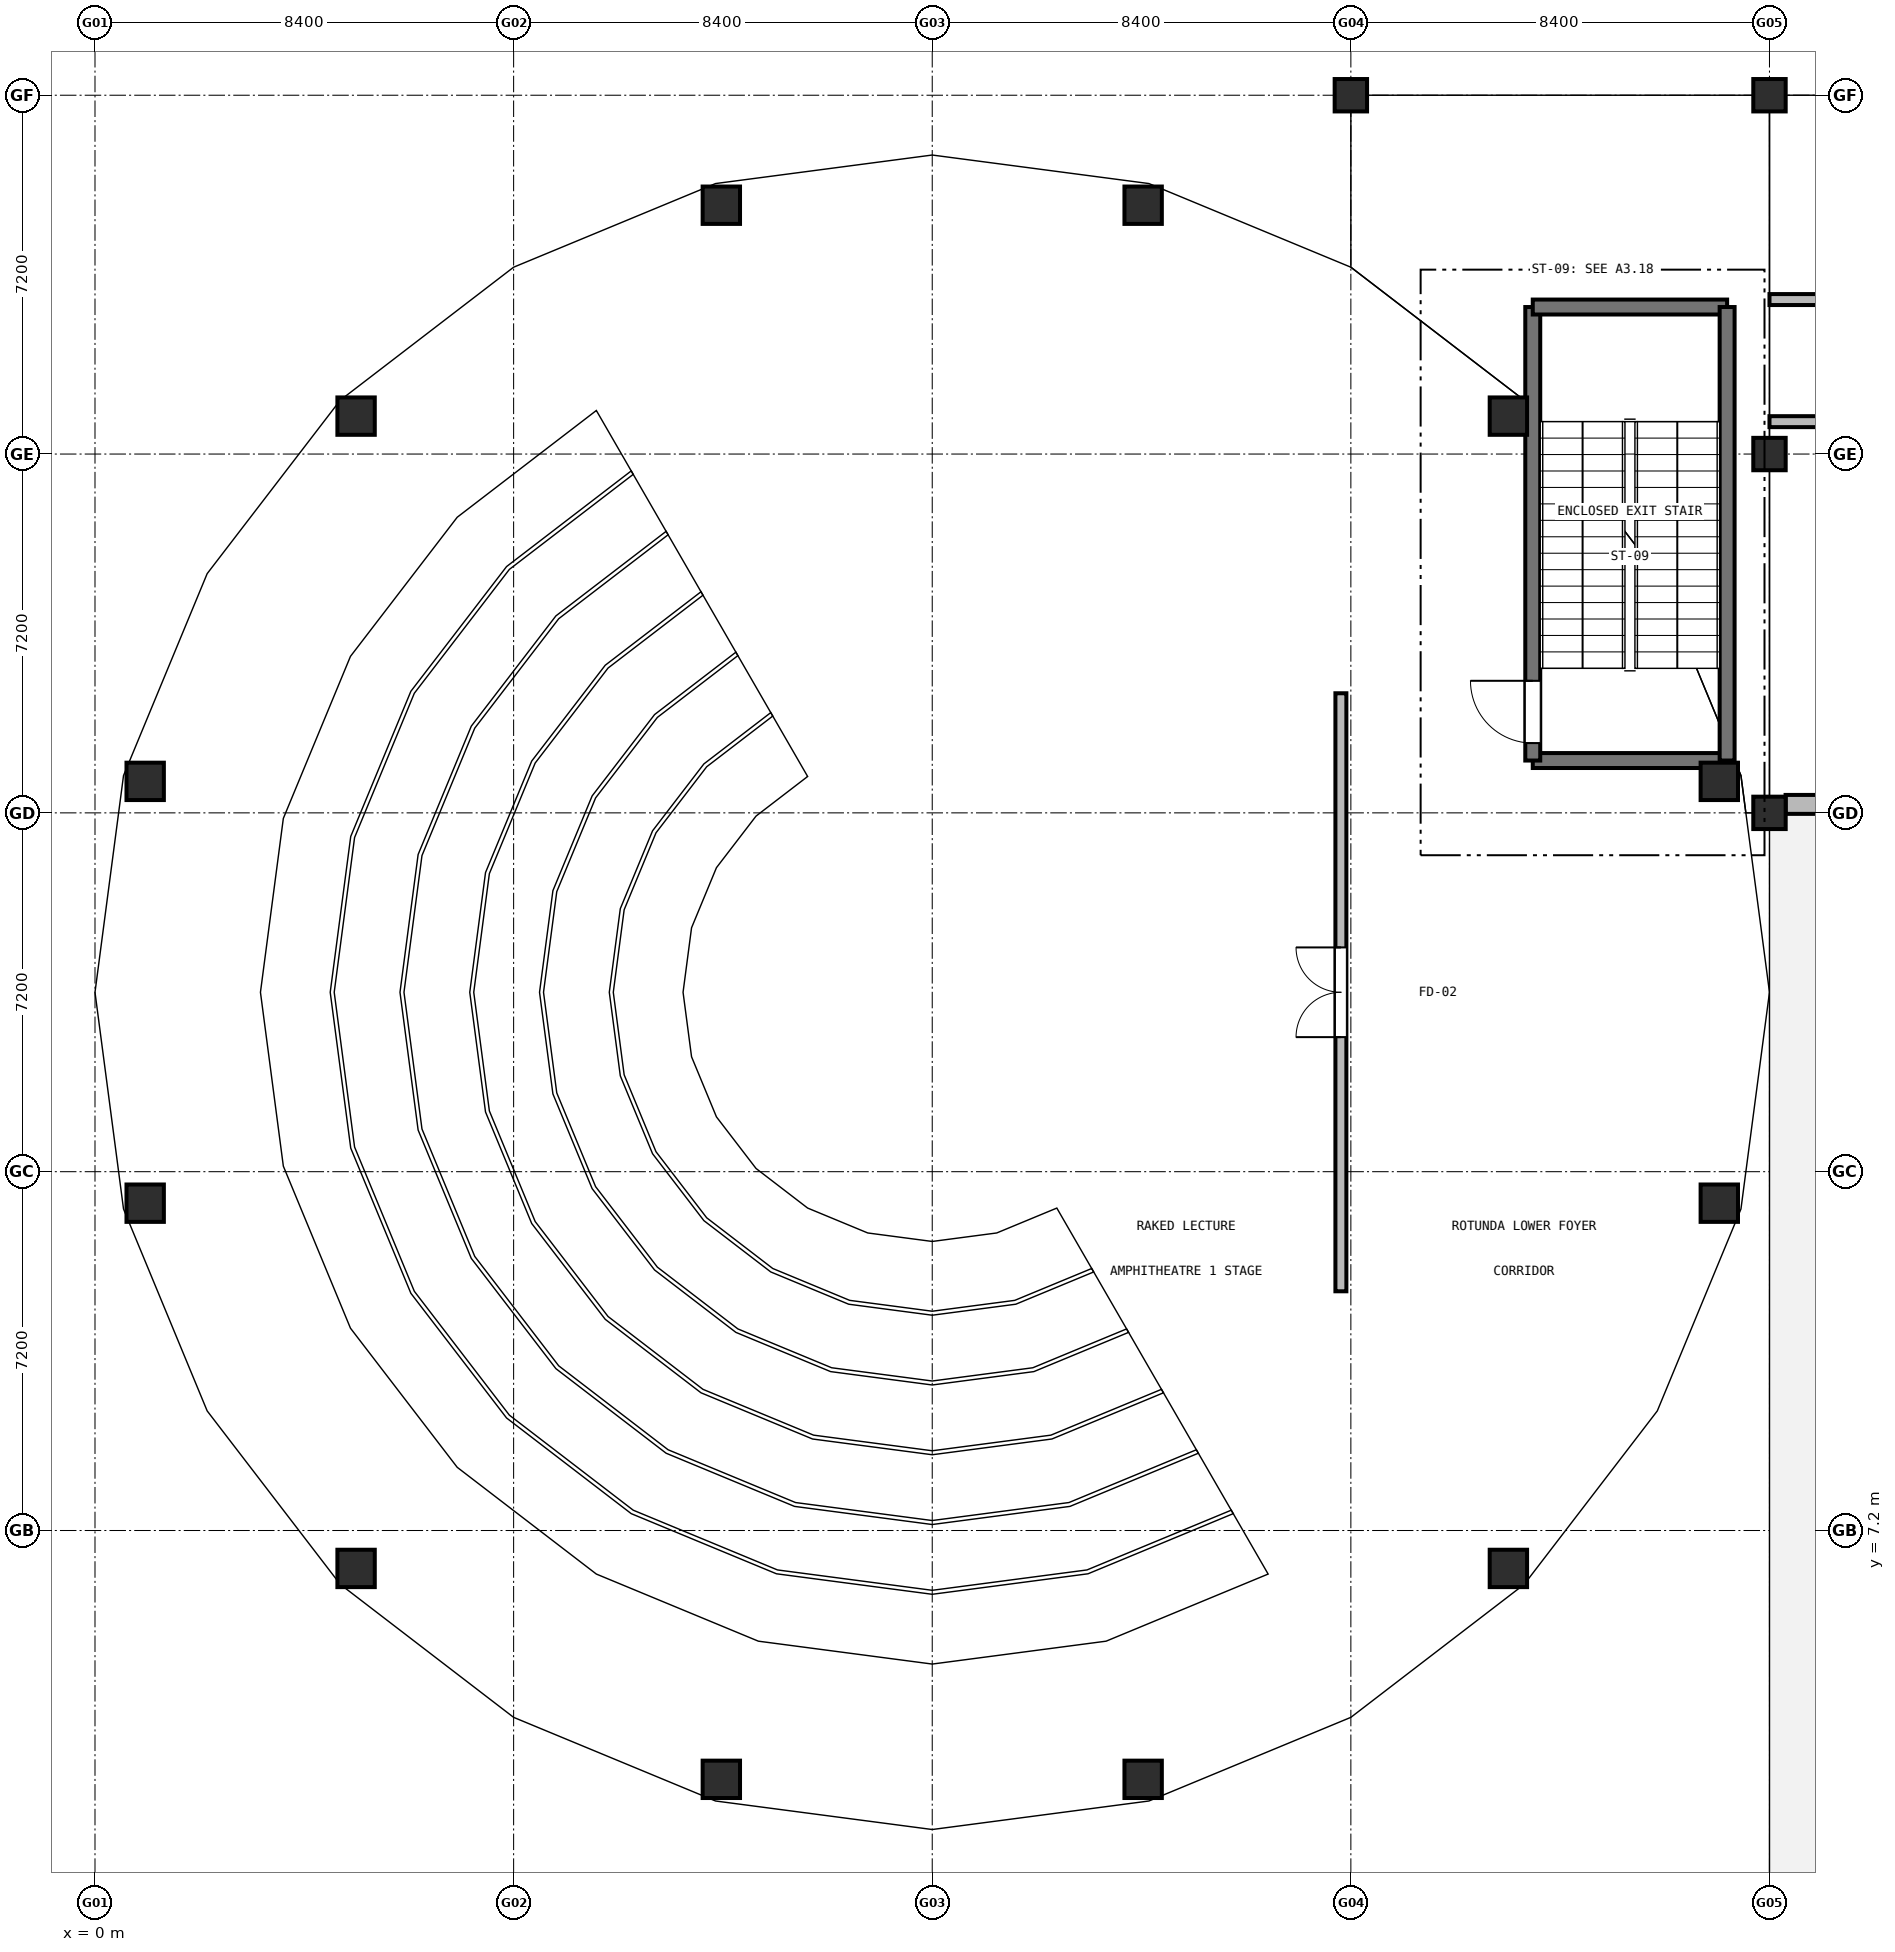
"""IFC4 building model, lengths in metres.
Left out: names, types, materials, properties, quantities, classifications, styles, units other than length and angle.
Written with IfcOpenShell. Run it as: python <this file> out.ifc"""

import sys

from ifc_helpers import new_model, si_unit, direction, frame, frame_2d, origin, origin_2d, place, context, subcontext, project, spatial, rectangle, circle, extrude, element, fill, save


model = new_model("IFC4")
c1 = context("Model", 3, precision=1e-05, world=origin(), true_north=direction((0.0, 1.0)))
c2 = subcontext(c1, "Body", "Model", "MODEL_VIEW")
j1 = project(units=[si_unit("LENGTHUNIT", "METRE"), si_unit("PLANEANGLEUNIT", "RADIAN")], contexts=[c1])
p1 = place(None, origin())
s1 = spatial("IfcSite", under=j1, at=p1, CompositionType="ELEMENT")
p2 = place(p1, origin())
s2 = spatial("IfcBuilding", under=s1, at=p2, CompositionType="ELEMENT")
p3 = place(p2, frame((0.0, 0.0, -4.8)))
s3 = spatial("IfcBuildingStorey", under=s2, at=p3, CompositionType="ELEMENT", Elevation=-4.8)
for number, where, z_axis, x_axis in (
    (1, (1.007, 13.768, 0.0), (0.0, 0.0, 1.0), (1.0, 0.0, 0.0)),
    (2, (1.007, 22.232, 0.0), (0.0, 0.0, 1.0), (1.0, 0.0, 0.0)),
    (3, (5.239, 6.439, 0.0), (0.0, 0.0, 1.0), (1.0, 0.0, 0.0)),
    (4, (5.239, 29.561, 0.0), (0.0, 0.0, 1.0), (1.0, 0.0, 0.0)),
    (5, (12.568, 2.207, 0.0), (0.0, 0.0, 1.0), (1.0, 0.0, 0.0)),
    (6, (12.568, 33.793, 0.0), (0.0, 0.0, 1.0), (1.0, 0.0, 0.0)),
    (7, (21.032, 2.207, 0.0), (0.0, 0.0, 1.0), (1.0, 0.0, 0.0)),
    (8, (21.032, 33.793, 0.0), (0.0, 0.0, 1.0), (1.0, 0.0, 0.0)),
):
    element("IfcColumn", number, at=place(p3, frame(where, z_axis=z_axis, x_axis=x_axis)), inside=s3, PredefinedType="COLUMN", context=c2, shape_type="SweptSolid", body=[
        extrude(circle(Radius=0.375, at=origin_2d()), origin(), (0.0, 0.0, 1.0), 4.8),
    ])
p4 = place(p3, frame((25.2, 36.0, 0.0), z_axis=(0.0, 0.0, 1.0), x_axis=(1.0, 0.0, 0.0)))
e9 = element("IfcColumn", 9, at=p4, inside=s3, PredefinedType="COLUMN", context=c2, shape_type="SweptSolid", body=[
    extrude(rectangle(XDim=0.65, YDim=0.65, at=origin_2d()), origin(), (0.0, 0.0, 1.0), 4.8),
])
for number, where, z_axis, x_axis in (
    (10, (28.361, 6.439, 0.0), (0.0, 0.0, 1.0), (1.0, 0.0, 0.0)),
    (11, (28.361, 29.561, 0.0), (0.0, 0.0, 1.0), (1.0, 0.0, 0.0)),
    (12, (32.593, 13.768, 0.0), (0.0, 0.0, 1.0), (1.0, 0.0, 0.0)),
    (13, (32.593, 22.232, 0.0), (0.0, 0.0, 1.0), (1.0, 0.0, 0.0)),
):
    element("IfcColumn", number, at=place(p3, frame(where, z_axis=z_axis, x_axis=x_axis)), inside=s3, PredefinedType="COLUMN", context=c2, shape_type="SweptSolid", body=[
        extrude(circle(Radius=0.375, at=origin_2d()), origin(), (0.0, 0.0, 1.0), 4.8),
    ])
for number, where, z_axis, x_axis in (
    (14, (33.6, 21.6, 0.0), (0.0, 0.0, 1.0), (1.0, 0.0, 0.0)),
    (15, (33.6, 28.8, 0.0), (0.0, 0.0, 1.0), (1.0, 0.0, 0.0)),
    (16, (33.6, 36.0, 0.0), (0.0, 0.0, 1.0), (1.0, 0.0, 0.0)),
):
    element("IfcColumn", number, at=place(p3, frame(where, z_axis=z_axis, x_axis=x_axis)), inside=s3, PredefinedType="COLUMN", context=c2, shape_type="SweptSolid", body=[
        extrude(rectangle(XDim=0.65, YDim=0.65, at=origin_2d()), origin(), (0.0, 0.0, 1.0), 4.8),
    ])
p5 = place(p3, frame((41.752, 21.77, 0.0), z_axis=(0.0, 0.0, 1.0), x_axis=(-1.0, 0.0, 0.0)))
e17 = element("IfcWall", 17, at=p5, inside=s3, PredefinedType="SOLIDWALL", context=c2, shape_type="SweptSolid", body=[
    extrude(rectangle(XDim=7.829, YDim=0.38, at=frame_2d((3.915, 0.0))), origin(), (0.0, 0.0, 1.0), 3.64),
])
p6 = place(p3, frame((32.75, 22.65, 0.0), z_axis=(0.0, 0.0, 1.0), x_axis=(-1.0, 0.0, 0.0)))
e18 = element("IfcWall", 18, at=p6, inside=s3, PredefinedType="SHEAR", context=c2, shape_type="SweptSolid", body=[
    extrude(rectangle(XDim=3.9, YDim=0.3, at=frame_2d((1.95, 0.0))), origin(), (0.0, 0.0, 1.0), 4.5),
])
p7 = place(p3, frame((28.85, 22.65, 0.0), z_axis=(0.0, 0.0, 1.0), x_axis=(0.0, 1.0, 0.0)))
e19 = element("IfcWall", 19, at=p7, inside=s3, PredefinedType="SHEAR", context=c2, shape_type="SweptSolid", body=[
    extrude(rectangle(XDim=9.1, YDim=0.3, at=frame_2d((4.55, 0.0))), origin(), (0.0, 0.0, 1.0), 4.5),
])
p8 = place(p7, frame((0.35, 0.0, 0.0)))
e20 = element("IfcOpeningElement", 20, at=p8, cuts=e19, PredefinedType="OPENING", context=c2, shape_type="SweptSolid", body=[
    extrude(rectangle(XDim=1.25, YDim=2.2, at=frame_2d((0.625, 1.1))), frame((0.0, 0.16, 0.0), z_axis=(0.0, -1.0, 0.0), x_axis=(1.0, 0.0, 0.0)), (0.0, 0.0, 1.0), 0.32),
])
p9 = place(p3, frame((28.85, 31.75, 0.0), z_axis=(0.0, 0.0, 1.0), x_axis=(1.0, 0.0, 0.0)))
e21 = element("IfcWall", 21, at=p9, inside=s3, PredefinedType="SHEAR", context=c2, shape_type="SweptSolid", body=[
    extrude(rectangle(XDim=3.9, YDim=0.3, at=frame_2d((1.95, 0.0))), origin(), (0.0, 0.0, 1.0), 4.5),
])
p10 = place(p3, frame((32.75, 31.75, 0.0), z_axis=(0.0, 0.0, 1.0), x_axis=(0.0, -1.0, 0.0)))
e22 = element("IfcWall", 22, at=p10, inside=s3, PredefinedType="SHEAR", context=c2, shape_type="SweptSolid", body=[
    extrude(rectangle(XDim=9.1, YDim=0.3, at=frame_2d((4.55, 0.0))), origin(), (0.0, 0.0, 1.0), 4.5),
])
p11 = place(p3, frame((33.6, 31.9, 0.0), z_axis=(0.0, 0.0, 1.0), x_axis=(1.0, 0.0, 0.0)))
e23 = element("IfcWall", 23, at=p11, inside=s3, PredefinedType="SOLIDWALL", context=c2, shape_type="SweptSolid", body=[
    extrude(rectangle(XDim=33.6, YDim=0.22, at=frame_2d((16.8, 0.0))), origin(), (0.0, 0.0, 1.0), 3.785),
])
p12 = place(p11, frame((3.425, 0.0, 0.0)))
e24 = element("IfcOpeningElement", 24, at=p12, cuts=e23, PredefinedType="OPENING", context=c2, shape_type="SweptSolid", body=[
    extrude(rectangle(XDim=1.55, YDim=2.2, at=frame_2d((0.775, 1.1))), frame((0.0, 0.12, 0.0), z_axis=(0.0, -1.0, 0.0), x_axis=(1.0, 0.0, 0.0)), (0.0, 0.0, 1.0), 0.24),
])
p13 = place(p3, frame((75.6, 29.45, 0.0), z_axis=(0.0, 0.0, 1.0), x_axis=(-1.0, 0.0, 0.0)))
e25 = element("IfcWall", 25, at=p13, inside=s3, PredefinedType="SOLIDWALL", context=c2, shape_type="SweptSolid", body=[
    extrude(rectangle(XDim=42.0, YDim=0.22, at=frame_2d((21.0, 0.0))), origin(), (0.0, 0.0, 1.0), 3.785),
])
p14 = place(p13, frame((36.975, 0.0, 0.0)))
e26 = element("IfcOpeningElement", 26, at=p14, cuts=e25, PredefinedType="OPENING", context=c2, shape_type="SweptSolid", body=[
    extrude(rectangle(XDim=1.65, YDim=2.2, at=frame_2d((0.825, 1.1))), frame((0.0, 0.12, 0.0), z_axis=(0.0, -1.0, 0.0), x_axis=(1.0, 0.0, 0.0)), (0.0, 0.0, 1.0), 0.24),
])
p15 = place(p3, frame((25.0, 12.0, 0.0), z_axis=(0.0, 0.0, 1.0), x_axis=(0.0, 1.0, 0.0)))
e27 = element("IfcWall", 27, at=p15, inside=s3, PredefinedType="SOLIDWALL", context=c2, shape_type="SweptSolid", body=[
    extrude(rectangle(XDim=12.0, YDim=0.22, at=frame_2d((6.0, 0.0))), origin(), (0.0, 0.0, 1.0), 4.45),
])
p16 = place(p15, frame((5.1, 0.0, 0.0)))
e28 = element("IfcOpeningElement", 28, at=p16, cuts=e27, PredefinedType="OPENING", context=c2, shape_type="SweptSolid", body=[
    extrude(rectangle(XDim=1.8, YDim=2.2, at=frame_2d((0.9, 1.1))), frame((0.0, 0.12, 0.0), z_axis=(0.0, -1.0, 0.0), x_axis=(1.0, 0.0, 0.0)), (0.0, 0.0, 1.0), 0.24),
])
p17 = place(p8, origin())
e29 = element("IfcDoor", 29, at=p17, inside=s3, OperationType="SINGLE_SWING_RIGHT", PredefinedType="DOOR", context=c2, shape_type="SweptSolid", body=[
    extrude(rectangle(XDim=1.25, YDim=2.2, at=frame_2d((0.625, 1.1))), frame((0.0, 0.025, 0.0), z_axis=(0.0, -1.0, 0.0), x_axis=(1.0, 0.0, 0.0)), (0.0, 0.0, 1.0), 0.05),
])
fill(e20, e29)
p18 = place(p16, origin())
e30 = element("IfcDoor", 30, at=p18, inside=s3, OperationType="DOUBLE_DOOR_SINGLE_SWING", PredefinedType="DOOR", context=c2, shape_type="SweptSolid", body=[
    extrude(rectangle(XDim=1.8, YDim=2.2, at=frame_2d((0.9, 1.1))), frame((0.0, 0.025, 0.0), z_axis=(0.0, -1.0, 0.0), x_axis=(1.0, 0.0, 0.0)), (0.0, 0.0, 1.0), 0.05),
])
fill(e28, e30)
save(model, sys.argv[1])
